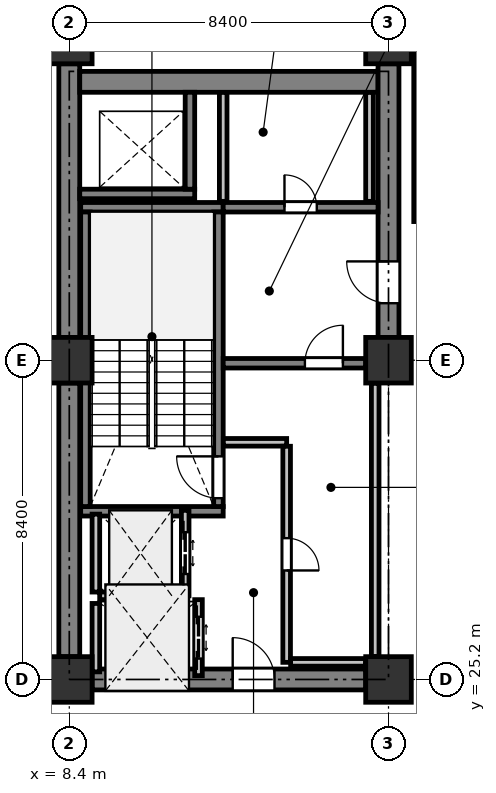
"""IFC4 building model, lengths in metres.
Left out: names, types, materials, properties, quantities, classifications, styles, units other than length and angle.
Written with IfcOpenShell. Run it as: python <this file> out.ifc"""

import sys

from ifc_helpers import new_model, si_unit, direction, frame, frame_2d, origin, origin_2d, place, context, subcontext, project, spatial, rectangle, extrude, element, fill, save


model = new_model("IFC4")
c1 = context("Model", 3, precision=1e-05, world=origin(), true_north=direction((0.0, 1.0)))
c2 = subcontext(c1, "Body", "Model", "MODEL_VIEW")
j1 = project(units=[si_unit("LENGTHUNIT", "METRE"), si_unit("PLANEANGLEUNIT", "RADIAN")], contexts=[c1])
p1 = place(None, origin())
s1 = spatial("IfcSite", under=j1, at=p1, CompositionType="ELEMENT")
p2 = place(p1, origin())
s2 = spatial("IfcBuilding", under=s1, at=p2, CompositionType="ELEMENT")
p3 = place(p2, frame((0.0, 0.0, 154.1)))
s3 = spatial("IfcBuildingStorey", under=s2, at=p3, CompositionType="ELEMENT", Elevation=154.1)
for number, where, z_axis, x_axis in (
    (1, (8.4, 25.2, 0.0), (0.0, 0.0, 1.0), (1.0, 0.0, 0.0)),
    (2, (8.4, 33.6, 0.0), (0.0, 0.0, 1.0), (1.0, 0.0, 0.0)),
    (3, (8.4, 42.0, 0.0), (0.0, 0.0, 1.0), (1.0, 0.0, 0.0)),
    (4, (16.8, 25.2, 0.0), (0.0, 0.0, 1.0), (1.0, 0.0, 0.0)),
    (5, (16.8, 33.6, 0.0), (0.0, 0.0, 1.0), (1.0, 0.0, 0.0)),
    (6, (16.8, 42.0, 0.0), (0.0, 0.0, 1.0), (1.0, 0.0, 0.0)),
):
    element("IfcColumn", number, at=place(p3, frame(where, z_axis=z_axis, x_axis=x_axis)), inside=s3, PredefinedType="COLUMN", context=c2, shape_type="SweptSolid", body=[
        extrude(rectangle(XDim=1.2, YDim=1.2, at=origin_2d()), origin(), (0.0, 0.0, 1.0), 4.1),
    ])
for number, where, z_axis, x_axis in (
    (7, (8.4, 25.8, 0.0), (0.0, 0.0, 1.0), (0.0, 1.0, 0.0)),
    (8, (8.4, 34.2, 0.0), (0.0, 0.0, 1.0), (0.0, 1.0, 0.0)),
):
    element("IfcWall", number, at=place(p3, frame(where, z_axis=z_axis, x_axis=x_axis)), inside=s3, PredefinedType="SHEAR", context=c2, shape_type="SweptSolid", body=[
        extrude(rectangle(XDim=7.2, YDim=0.55, at=frame_2d((3.6, 0.0))), origin(), (0.0, 0.0, 1.0), 3.825),
    ])
p4 = place(p3, frame((8.675, 40.925, 0.0), z_axis=(0.0, 0.0, 1.0), x_axis=(1.0, 0.0, 0.0)))
e9 = element("IfcWall", 9, at=p4, inside=s3, PredefinedType="SHEAR", context=c2, shape_type="SweptSolid", body=[
    extrude(rectangle(XDim=7.85, YDim=0.55, at=frame_2d((3.925, 0.0))), origin(), (0.0, 0.0, 1.0), 3.825),
])
p5 = place(p3, frame((16.8, 34.2, 0.0), z_axis=(0.0, 0.0, 1.0), x_axis=(0.0, 1.0, 0.0)))
e10 = element("IfcWall", 10, at=p5, inside=s3, PredefinedType="SHEAR", context=c2, shape_type="SweptSolid", body=[
    extrude(rectangle(XDim=7.2, YDim=0.55, at=frame_2d((3.6, 0.0))), origin(), (0.0, 0.0, 1.0), 3.825),
])
p6 = place(p5, frame((0.9, 0.0, 0.0)))
e11 = element("IfcOpeningElement", 11, at=p6, cuts=e10, PredefinedType="OPENING", context=c2, shape_type="SweptSolid", body=[
    extrude(rectangle(XDim=1.1, YDim=2.15, at=frame_2d((0.55, 1.075))), frame((0.0, 0.285, 0.0), z_axis=(0.0, -1.0, 0.0), x_axis=(1.0, 0.0, 0.0)), (0.0, 0.0, 1.0), 0.57),
])
p7 = place(p3, frame((9.0, 25.2, 0.0), z_axis=(0.0, 0.0, 1.0), x_axis=(1.0, 0.0, 0.0)))
e12 = element("IfcWall", 12, at=p7, inside=s3, PredefinedType="SHEAR", context=c2, shape_type="SweptSolid", body=[
    extrude(rectangle(XDim=7.2, YDim=0.55, at=frame_2d((3.6, 0.0))), origin(), (0.0, 0.0, 1.0), 3.825),
])
p8 = place(p7, frame((3.7, 0.0, 0.0)))
e13 = element("IfcOpeningElement", 13, at=p8, cuts=e12, PredefinedType="OPENING", context=c2, shape_type="SweptSolid", body=[
    extrude(rectangle(XDim=1.1, YDim=2.15, at=frame_2d((0.55, 1.075))), frame((0.0, 0.285, 0.0), z_axis=(0.0, -1.0, 0.0), x_axis=(1.0, 0.0, 0.0)), (0.0, 0.0, 1.0), 0.57),
])
for number, where, z_axis, x_axis in (
    (14, (12.45, 29.625, 0.0), (0.0, 0.0, 1.0), (-1.0, 0.0, 0.0)),
    (15, (12.45, 37.625, 0.0), (0.0, 0.0, 1.0), (-1.0, 0.0, 0.0)),
):
    element("IfcWall", number, at=place(p3, frame(where, z_axis=z_axis, x_axis=x_axis)), inside=s3, PredefinedType="SHEAR", context=c2, shape_type="SweptSolid", body=[
        extrude(rectangle(XDim=3.75, YDim=0.25, at=frame_2d((1.875, 0.0))), origin(), (0.0, 0.0, 1.0), 3.825),
    ])
p9 = place(p3, frame((12.325, 29.75, 0.0), z_axis=(0.0, 0.0, 1.0), x_axis=(0.0, 1.0, 0.0)))
e16 = element("IfcWall", 16, at=p9, inside=s3, PredefinedType="SHEAR", context=c2, shape_type="SweptSolid", body=[
    extrude(rectangle(XDim=7.75, YDim=0.25, at=frame_2d((3.875, 0.0))), origin(), (0.0, 0.0, 1.0), 3.825),
])
p10 = place(p9, frame((0.22, 0.0, 0.0)))
e17 = element("IfcOpeningElement", 17, at=p10, cuts=e16, PredefinedType="OPENING", context=c2, shape_type="SweptSolid", body=[
    extrude(rectangle(XDim=1.1, YDim=2.15, at=frame_2d((0.55, 1.075))), frame((0.0, 0.135, 0.0), z_axis=(0.0, -1.0, 0.0), x_axis=(1.0, 0.0, 0.0)), (0.0, 0.0, 1.0), 0.27),
])
p11 = place(p3, frame((8.825, 29.75, 0.0), z_axis=(0.0, 0.0, 1.0), x_axis=(0.0, 1.0, 0.0)))
e18 = element("IfcWall", 18, at=p11, inside=s3, PredefinedType="SHEAR", context=c2, shape_type="SweptSolid", body=[
    extrude(rectangle(XDim=7.75, YDim=0.25, at=frame_2d((3.875, 0.0))), origin(), (0.0, 0.0, 1.0), 3.825),
])
p12 = place(p3, frame((8.675, 37.975, 0.0), z_axis=(0.0, 0.0, 1.0), x_axis=(1.0, 0.0, 0.0)))
e19 = element("IfcWall", 19, at=p12, inside=s3, PredefinedType="SHEAR", context=c2, shape_type="SweptSolid", body=[
    extrude(rectangle(XDim=3.025, YDim=0.25, at=frame_2d((1.512, 0.0))), origin(), (0.0, 0.0, 1.0), 3.825),
])
p13 = place(p3, frame((11.575, 38.1, 0.0), z_axis=(0.0, 0.0, 1.0), x_axis=(0.0, 1.0, 0.0)))
e20 = element("IfcWall", 20, at=p13, inside=s3, PredefinedType="SHEAR", context=c2, shape_type="SweptSolid", body=[
    extrude(rectangle(XDim=2.55, YDim=0.25, at=frame_2d((1.275, 0.0))), origin(), (0.0, 0.0, 1.0), 3.825),
])
p14 = place(p3, frame((12.45, 33.52, 0.0), z_axis=(0.0, 0.0, 1.0), x_axis=(1.0, 0.0, 0.0)))
e21 = element("IfcWall", 21, at=p14, inside=s3, PredefinedType="SHEAR", context=c2, shape_type="SweptSolid", body=[
    extrude(rectangle(XDim=3.75, YDim=0.25, at=frame_2d((1.875, 0.0))), origin(), (0.0, 0.0, 1.0), 3.825),
])
p15 = place(p14, frame((2.15, 0.0, 0.0)))
e22 = element("IfcOpeningElement", 22, at=p15, cuts=e21, PredefinedType="OPENING", context=c2, shape_type="SweptSolid", body=[
    extrude(rectangle(XDim=1.0, YDim=2.15, at=frame_2d((0.5, 1.075))), frame((0.0, 0.135, 0.0), z_axis=(0.0, -1.0, 0.0), x_axis=(1.0, 0.0, 0.0)), (0.0, 0.0, 1.0), 0.27),
])
p16 = place(p3, frame((12.45, 37.625, 0.0), z_axis=(0.0, 0.0, 1.0), x_axis=(1.0, 0.0, 0.0)))
e23 = element("IfcWall", 23, at=p16, inside=s3, PredefinedType="SHEAR", context=c2, shape_type="SweptSolid", body=[
    extrude(rectangle(XDim=4.075, YDim=0.25, at=frame_2d((2.038, 0.0))), origin(), (0.0, 0.0, 1.0), 3.825),
])
p17 = place(p16, frame((1.613, 0.0, 0.0)))
e24 = element("IfcOpeningElement", 24, at=p17, cuts=e23, PredefinedType="OPENING", context=c2, shape_type="SweptSolid", body=[
    extrude(rectangle(XDim=0.85, YDim=2.15, at=frame_2d((0.425, 1.075))), frame((0.0, 0.135, 0.0), z_axis=(0.0, -1.0, 0.0), x_axis=(1.0, 0.0, 0.0)), (0.0, 0.0, 1.0), 0.27),
])
p18 = place(p3, frame((11.45, 27.4, 0.0), z_axis=(0.0, 0.0, 1.0), x_axis=(0.0, 1.0, 0.0)))
e25 = element("IfcWall", 25, at=p18, inside=s3, PredefinedType="PARTITIONING", context=c2, shape_type="SweptSolid", body=[
    extrude(rectangle(XDim=2.25, YDim=0.2, at=frame_2d((1.125, 0.0))), origin(), (0.0, 0.0, 1.0), 3.825),
])
p19 = place(p18, frame((0.575, 0.0, 0.0)))
e26 = element("IfcOpeningElement", 26, at=p19, cuts=e25, PredefinedType="OPENING", context=c2, shape_type="SweptSolid", body=[
    extrude(rectangle(XDim=1.1, YDim=2.2, at=frame_2d((0.55, 1.1))), frame((0.0, 0.11, 0.0), z_axis=(0.0, -1.0, 0.0), x_axis=(1.0, 0.0, 0.0)), (0.0, 0.0, 1.0), 0.22),
])
p20 = place(p3, frame((9.1, 27.5, 0.0), z_axis=(0.0, 0.0, 1.0), x_axis=(0.0, 1.0, 0.0)))
e27 = element("IfcWall", 27, at=p20, inside=s3, PredefinedType="PARTITIONING", context=c2, shape_type="SweptSolid", body=[
    extrude(rectangle(XDim=2.05, YDim=0.2, at=frame_2d((1.025, 0.0))), origin(), (0.0, 0.0, 1.0), 3.825),
])
p21 = place(p3, frame((9.2, 27.4, 0.0), z_axis=(0.0, 0.0, 1.0), x_axis=(1.0, 0.0, 0.0)))
e28 = element("IfcWall", 28, at=p21, inside=s3, PredefinedType="PARTITIONING", context=c2, shape_type="SweptSolid", body=[
    extrude(rectangle(XDim=2.15, YDim=0.2, at=frame_2d((1.075, 0.0))), origin(), (0.0, 0.0, 1.0), 3.825),
])
p22 = place(p3, frame((11.8, 25.3, 0.0), z_axis=(0.0, 0.0, 1.0), x_axis=(0.0, 1.0, 0.0)))
e29 = element("IfcWall", 29, at=p22, inside=s3, PredefinedType="PARTITIONING", context=c2, shape_type="SweptSolid", body=[
    extrude(rectangle(XDim=2.0, YDim=0.2, at=frame_2d((1.0, 0.0))), origin(), (0.0, 0.0, 1.0), 3.825),
])
p23 = place(p22, frame((0.45, 0.0, 0.0)))
e30 = element("IfcOpeningElement", 30, at=p23, cuts=e29, PredefinedType="OPENING", context=c2, shape_type="SweptSolid", body=[
    extrude(rectangle(XDim=1.1, YDim=2.2, at=frame_2d((0.55, 1.1))), frame((0.0, 0.11, 0.0), z_axis=(0.0, -1.0, 0.0), x_axis=(1.0, 0.0, 0.0)), (0.0, 0.0, 1.0), 0.22),
])
p24 = place(p3, frame((9.1, 25.4, 0.0), z_axis=(0.0, 0.0, 1.0), x_axis=(0.0, 1.0, 0.0)))
e31 = element("IfcWall", 31, at=p24, inside=s3, PredefinedType="PARTITIONING", context=c2, shape_type="SweptSolid", body=[
    extrude(rectangle(XDim=1.8, YDim=0.2, at=frame_2d((0.9, 0.0))), origin(), (0.0, 0.0, 1.0), 3.825),
])
p25 = place(p3, frame((16.45, 25.805, 0.0), z_axis=(0.0, 0.0, 1.0), x_axis=(0.0, 1.0, 0.0)))
e32 = element("IfcWall", 32, at=p25, inside=s3, PredefinedType="PARTITIONING", context=c2, shape_type="SweptSolid", body=[
    extrude(rectangle(XDim=7.19, YDim=0.2, at=frame_2d((3.595, 0.0))), origin(), (0.0, 0.0, 1.0), 3.825),
])
p26 = place(p3, frame((12.454, 31.44, 0.0), z_axis=(0.0, 0.0, 1.0), x_axis=(1.0, 0.0, 0.0)))
e33 = element("IfcWall", 33, at=p26, inside=s3, PredefinedType="PARTITIONING", context=c2, shape_type="SweptSolid", body=[
    extrude(rectangle(XDim=1.666, YDim=0.2, at=frame_2d((0.833, 0.0))), origin(), (0.0, 0.0, 1.0), 3.825),
])
p27 = place(p3, frame((14.12, 31.336, 0.0), z_axis=(0.0, 0.0, 1.0), x_axis=(0.0, -1.0, 0.0)))
e34 = element("IfcWall", 34, at=p27, inside=s3, PredefinedType="PARTITIONING", context=c2, shape_type="SweptSolid", body=[
    extrude(rectangle(XDim=5.686, YDim=0.2, at=frame_2d((2.843, 0.0))), origin(), (0.0, 0.0, 1.0), 3.825),
])
p28 = place(p27, frame((2.418, 0.0, 0.0)))
e35 = element("IfcOpeningElement", 35, at=p28, cuts=e34, PredefinedType="OPENING", context=c2, shape_type="SweptSolid", body=[
    extrude(rectangle(XDim=0.85, YDim=2.15, at=frame_2d((0.425, 1.075))), frame((0.0, 0.11, 0.0), z_axis=(0.0, -1.0, 0.0), x_axis=(1.0, 0.0, 0.0)), (0.0, 0.0, 1.0), 0.22),
])
p29 = place(p3, frame((14.224, 25.65, 0.0), z_axis=(0.0, 0.0, 1.0), x_axis=(1.0, 0.0, 0.0)))
e36 = element("IfcWall", 36, at=p29, inside=s3, PredefinedType="PARTITIONING", context=c2, shape_type="SweptSolid", body=[
    extrude(rectangle(XDim=1.971, YDim=0.2, at=frame_2d((0.985, 0.0))), origin(), (0.0, 0.0, 1.0), 3.825),
])
for number, where, z_axis, x_axis in (
    (37, (16.3, 37.78, 0.0), (0.0, 0.0, 1.0), (0.0, 1.0, 0.0)),
    (38, (12.45, 40.646, 0.0), (0.0, 0.0, 1.0), (0.0, -1.0, 0.0)),
):
    element("IfcWall", number, at=place(p3, frame(where, z_axis=z_axis, x_axis=x_axis)), inside=s3, PredefinedType="PARTITIONING", context=c2, shape_type="SweptSolid", body=[
        extrude(rectangle(XDim=2.866, YDim=0.2, at=frame_2d((1.433, 0.0))), origin(), (0.0, 0.0, 1.0), 2.725),
    ])
p30 = place(p3, frame((17.54, 37.248, 0.0), z_axis=(0.0, 0.0, 1.0), x_axis=(0.0, 1.0, 0.0)))
e39 = element("IfcWall", 39, at=p30, inside=s3, PredefinedType="PARTITIONING", context=c2, shape_type="SweptSolid", body=[
    extrude(rectangle(XDim=5.752, YDim=0.15, at=frame_2d((2.876, 0.0))), origin(), (0.0, 0.0, 1.0), 3.292),
])
p31 = place(p6, origin())
e40 = element("IfcDoor", 40, at=p31, inside=s3, OperationType="SINGLE_SWING_RIGHT", PredefinedType="DOOR", context=c2, shape_type="SweptSolid", body=[
    extrude(rectangle(XDim=1.1, YDim=2.15, at=frame_2d((0.55, 1.075))), frame((0.0, 0.025, 0.0), z_axis=(0.0, -1.0, 0.0), x_axis=(1.0, 0.0, 0.0)), (0.0, 0.0, 1.0), 0.05),
])
fill(e11, e40)
p32 = place(p8, origin())
e41 = element("IfcDoor", 41, at=p32, inside=s3, OperationType="SINGLE_SWING_LEFT", PredefinedType="DOOR", context=c2, shape_type="SweptSolid", body=[
    extrude(rectangle(XDim=1.1, YDim=2.15, at=frame_2d((0.55, 1.075))), frame((0.0, 0.025, 0.0), z_axis=(0.0, -1.0, 0.0), x_axis=(1.0, 0.0, 0.0)), (0.0, 0.0, 1.0), 0.05),
])
fill(e13, e41)
p33 = place(p10, origin())
e42 = element("IfcDoor", 42, at=p33, inside=s3, OperationType="SINGLE_SWING_RIGHT", PredefinedType="DOOR", context=c2, shape_type="SweptSolid", body=[
    extrude(rectangle(XDim=1.1, YDim=2.15, at=frame_2d((0.55, 1.075))), frame((0.0, 0.025, 0.0), z_axis=(0.0, -1.0, 0.0), x_axis=(1.0, 0.0, 0.0)), (0.0, 0.0, 1.0), 0.05),
])
fill(e17, e42)
p34 = place(p15, origin())
e43 = element("IfcDoor", 43, at=p34, inside=s3, OperationType="SINGLE_SWING_RIGHT", PredefinedType="DOOR", context=c2, shape_type="SweptSolid", body=[
    extrude(rectangle(XDim=1.0, YDim=2.15, at=frame_2d((0.5, 1.075))), frame((0.0, 0.025, 0.0), z_axis=(0.0, -1.0, 0.0), x_axis=(1.0, 0.0, 0.0)), (0.0, 0.0, 1.0), 0.05),
])
fill(e22, e43)
p35 = place(p19, origin())
e44 = element("IfcDoor", 44, at=p35, inside=s3, OperationType="DOUBLE_DOOR_SLIDING", PredefinedType="DOOR", context=c2, shape_type="SweptSolid", body=[
    extrude(rectangle(XDim=1.1, YDim=2.2, at=frame_2d((0.55, 1.1))), frame((0.0, 0.025, 0.0), z_axis=(0.0, -1.0, 0.0), x_axis=(1.0, 0.0, 0.0)), (0.0, 0.0, 1.0), 0.05),
])
fill(e26, e44)
p36 = place(p23, origin())
e45 = element("IfcDoor", 45, at=p36, inside=s3, OperationType="DOUBLE_DOOR_SLIDING", PredefinedType="DOOR", context=c2, shape_type="SweptSolid", body=[
    extrude(rectangle(XDim=1.1, YDim=2.2, at=frame_2d((0.55, 1.1))), frame((0.0, 0.025, 0.0), z_axis=(0.0, -1.0, 0.0), x_axis=(1.0, 0.0, 0.0)), (0.0, 0.0, 1.0), 0.05),
])
fill(e30, e45)
p37 = place(p28, origin())
e46 = element("IfcDoor", 46, at=p37, inside=s3, OperationType="SINGLE_SWING_RIGHT", PredefinedType="DOOR", context=c2, shape_type="SweptSolid", body=[
    extrude(rectangle(XDim=0.85, YDim=2.15, at=frame_2d((0.425, 1.075))), frame((0.0, 0.025, 0.0), z_axis=(0.0, -1.0, 0.0), x_axis=(1.0, 0.0, 0.0)), (0.0, 0.0, 1.0), 0.05),
])
fill(e35, e46)
p38 = place(p17, origin())
e47 = element("IfcDoor", 47, at=p38, inside=s3, OperationType="SINGLE_SWING_LEFT", PredefinedType="DOOR", context=c2, shape_type="SweptSolid", body=[
    extrude(rectangle(XDim=0.85, YDim=2.15, at=frame_2d((0.425, 1.075))), frame((0.0, 0.025, 0.0), z_axis=(0.0, -1.0, 0.0), x_axis=(1.0, 0.0, 0.0)), (0.0, 0.0, 1.0), 0.05),
])
fill(e24, e47)
save(model, sys.argv[1])
